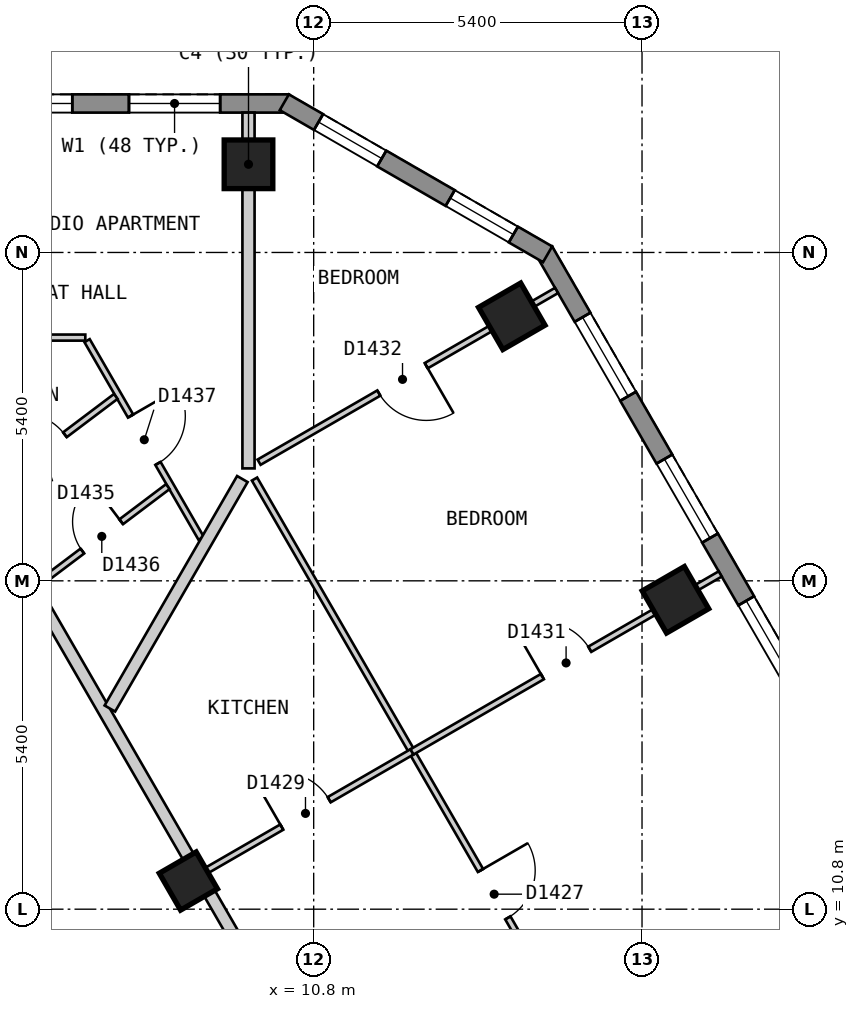
"""IFC4 building model, lengths in metres.
Left out: names, types, materials, properties, quantities, classifications, styles, units other than length and angle.
Written with IfcOpenShell. Run it as: python <this file> out.ifc"""

import sys

from ifc_helpers import new_model, si_unit, direction, frame, frame_2d, origin, origin_2d, place, context, subcontext, project, spatial, polyline, rectangle, outline, extrude, element, fill, save


model = new_model("IFC4")
c1 = context("Model", 3, precision=1e-05, world=origin(), true_north=direction((0.0, 1.0)))
c2 = subcontext(c1, "Body", "Model", "MODEL_VIEW")
j1 = project(units=[si_unit("LENGTHUNIT", "METRE"), si_unit("PLANEANGLEUNIT", "RADIAN")], contexts=[c1])
p1 = place(None, origin())
s1 = spatial("IfcSite", under=j1, at=p1, CompositionType="ELEMENT")
p2 = place(p1, origin())
s2 = spatial("IfcBuilding", under=s1, at=p2, CompositionType="ELEMENT")
p3 = place(p2, frame((0.0, 0.0, 166.2)))
s3 = spatial("IfcBuildingStorey", under=s2, at=p3, CompositionType="ELEMENT", Elevation=166.2)
for number, where, z_axis, x_axis in (
    (1, (9.728, 23.05, 0.0), (0.0, 0.0, 1.0), (-1.0, 0.0, 0.0)),
    (2, (16.75, 15.888, 0.0), (0.0, 0.0, 1.0), (-0.5, 0.866, 0.0)),
    (3, (14.058, 20.55, 0.0), (0.0, 0.0, 1.0), (-0.5, 0.866, 0.0)),
):
    element("IfcColumn", number, at=place(p3, frame(where, z_axis=z_axis, x_axis=x_axis)), inside=s3, PredefinedType="COLUMN", context=c2, shape_type="SweptSolid", body=[
        extrude(rectangle(XDim=0.8, YDim=0.8, at=origin_2d()), origin(), (0.0, 0.0, 1.0), 3.0),
    ])
p4 = place(p3, frame((8.739, 11.263, 0.0), z_axis=(0.0, 0.0, 1.0), x_axis=(-0.5, 0.866025403784, 0.0)))
e4 = element("IfcColumn", 4, at=p4, inside=s3, PredefinedType="COLUMN", context=c2, shape_type="SweptSolid", body=[
    extrude(rectangle(XDim=0.7, YDim=0.7, at=origin_2d()), origin(), (0.0, 0.0, 1.0), 3.0),
])
p5 = place(p3, frame((10.392, 24.05, 0.0), z_axis=(0.0, 0.0, 1.0), x_axis=(-1.0, 0.0, 0.0)))
e5 = element("IfcWall", 5, at=p5, inside=s3, PredefinedType="SOLIDWALL", context=c2, shape_type="SweptSolid", body=[
    extrude(outline(polyline([(0.0, -0.15), (20.784, -0.15), (20.704, 0.15), (0.08, 0.15), (0.0, -0.15)])), origin(), (0.0, 0.0, 1.0), 2.7),
])
p6 = place(p5, frame((1.13, 0.0, 0.15)))
e6 = element("IfcOpeningElement", 6, at=p6, cuts=e5, PredefinedType="OPENING", context=c2, shape_type="SweptSolid", body=[
    extrude(rectangle(XDim=1.5, YDim=2.1, at=frame_2d((0.75, 1.05))), frame((0.0, 0.16, 0.0), z_axis=(0.0, -1.0, 0.0), x_axis=(1.0, 0.0, 0.0)), (0.0, 0.0, 1.0), 0.32),
])
p7 = place(p5, frame((3.562, 0.0, 0.15)))
e7 = element("IfcOpeningElement", 7, at=p7, cuts=e5, PredefinedType="OPENING", context=c2, shape_type="SweptSolid", body=[
    extrude(rectangle(XDim=1.5, YDim=2.1, at=frame_2d((0.75, 1.05))), frame((0.0, 0.16, 0.0), z_axis=(0.0, -1.0, 0.0), x_axis=(1.0, 0.0, 0.0)), (0.0, 0.0, 1.0), 0.32),
])
p8 = place(p5, frame((5.994, 0.0, 0.15)))
e8 = element("IfcOpeningElement", 8, at=p8, cuts=e5, PredefinedType="OPENING", context=c2, shape_type="SweptSolid", body=[
    extrude(rectangle(XDim=1.5, YDim=2.1, at=frame_2d((0.75, 1.05))), frame((0.0, 0.16, 0.0), z_axis=(0.0, -1.0, 0.0), x_axis=(1.0, 0.0, 0.0)), (0.0, 0.0, 1.0), 0.32),
])
p9 = place(p5, frame((8.426, 0.0, 0.15)))
e9 = element("IfcOpeningElement", 9, at=p9, cuts=e5, PredefinedType="OPENING", context=c2, shape_type="SweptSolid", body=[
    extrude(rectangle(XDim=1.5, YDim=2.1, at=frame_2d((0.75, 1.05))), frame((0.0, 0.16, 0.0), z_axis=(0.0, -1.0, 0.0), x_axis=(1.0, 0.0, 0.0)), (0.0, 0.0, 1.0), 0.32),
])
p10 = place(p5, frame((10.858, 0.0, 0.15)))
e10 = element("IfcOpeningElement", 10, at=p10, cuts=e5, PredefinedType="OPENING", context=c2, shape_type="SweptSolid", body=[
    extrude(rectangle(XDim=1.5, YDim=2.1, at=frame_2d((0.75, 1.05))), frame((0.0, 0.16, 0.0), z_axis=(0.0, -1.0, 0.0), x_axis=(1.0, 0.0, 0.0)), (0.0, 0.0, 1.0), 0.32),
])
p11 = place(p5, frame((13.29, 0.0, 0.15)))
e11 = element("IfcOpeningElement", 11, at=p11, cuts=e5, PredefinedType="OPENING", context=c2, shape_type="SweptSolid", body=[
    extrude(rectangle(XDim=1.5, YDim=2.1, at=frame_2d((0.75, 1.05))), frame((0.0, 0.16, 0.0), z_axis=(0.0, -1.0, 0.0), x_axis=(1.0, 0.0, 0.0)), (0.0, 0.0, 1.0), 0.32),
])
p12 = place(p5, frame((15.722, 0.0, 0.15)))
e12 = element("IfcOpeningElement", 12, at=p12, cuts=e5, PredefinedType="OPENING", context=c2, shape_type="SweptSolid", body=[
    extrude(rectangle(XDim=1.5, YDim=2.1, at=frame_2d((0.75, 1.05))), frame((0.0, 0.16, 0.0), z_axis=(0.0, -1.0, 0.0), x_axis=(1.0, 0.0, 0.0)), (0.0, 0.0, 1.0), 0.32),
])
p13 = place(p5, frame((18.154, 0.0, 0.15)))
e13 = element("IfcOpeningElement", 13, at=p13, cuts=e5, PredefinedType="OPENING", context=c2, shape_type="SweptSolid", body=[
    extrude(rectangle(XDim=1.5, YDim=2.1, at=frame_2d((0.75, 1.05))), frame((0.0, 0.16, 0.0), z_axis=(0.0, -1.0, 0.0), x_axis=(1.0, 0.0, 0.0)), (0.0, 0.0, 1.0), 0.32),
])
p14 = place(p3, frame((26.024, 1.825, 0.0), z_axis=(0.0, 0.0, 1.0), x_axis=(-0.500010537973, 0.866019319597, 0.0)))
e14 = element("IfcWall", 14, at=p14, inside=s3, PredefinedType="SOLIDWALL", context=c2, shape_type="SweptSolid", body=[
    extrude(outline(polyline([(0.0, -0.15), (22.863, -0.15), (22.783, 0.15), (0.08, 0.15), (0.0, -0.15)])), origin(), (0.0, 0.0, 1.0), 2.7),
])
p15 = place(p14, frame((1.259, 0.0, 0.15)))
e15 = element("IfcOpeningElement", 15, at=p15, cuts=e14, PredefinedType="OPENING", context=c2, shape_type="SweptSolid", body=[
    extrude(rectangle(XDim=1.5, YDim=2.1, at=frame_2d((0.75, 1.05))), frame((0.0, 0.16, 0.0), z_axis=(0.0, -1.0, 0.0), x_axis=(1.0, 0.0, 0.0)), (0.0, 0.0, 1.0), 0.32),
])
p16 = place(p14, frame((3.952, 0.0, 0.15)))
e16 = element("IfcOpeningElement", 16, at=p16, cuts=e14, PredefinedType="OPENING", context=c2, shape_type="SweptSolid", body=[
    extrude(rectangle(XDim=1.5, YDim=2.1, at=frame_2d((0.75, 1.05))), frame((0.0, 0.16, 0.0), z_axis=(0.0, -1.0, 0.0), x_axis=(1.0, 0.0, 0.0)), (0.0, 0.0, 1.0), 0.32),
])
p17 = place(p14, frame((6.644, 0.0, 0.15)))
e17 = element("IfcOpeningElement", 17, at=p17, cuts=e14, PredefinedType="OPENING", context=c2, shape_type="SweptSolid", body=[
    extrude(rectangle(XDim=1.5, YDim=2.1, at=frame_2d((0.75, 1.05))), frame((0.0, 0.16, 0.0), z_axis=(0.0, -1.0, 0.0), x_axis=(1.0, 0.0, 0.0)), (0.0, 0.0, 1.0), 0.32),
])
p18 = place(p14, frame((9.335, 0.0, 0.15)))
e18 = element("IfcOpeningElement", 18, at=p18, cuts=e14, PredefinedType="OPENING", context=c2, shape_type="SweptSolid", body=[
    extrude(rectangle(XDim=1.5, YDim=2.1, at=frame_2d((0.75, 1.05))), frame((0.0, 0.16, 0.0), z_axis=(0.0, -1.0, 0.0), x_axis=(1.0, 0.0, 0.0)), (0.0, 0.0, 1.0), 0.32),
])
p19 = place(p14, frame((12.028, 0.0, 0.15)))
e19 = element("IfcOpeningElement", 19, at=p19, cuts=e14, PredefinedType="OPENING", context=c2, shape_type="SweptSolid", body=[
    extrude(rectangle(XDim=1.5, YDim=2.1, at=frame_2d((0.75, 1.05))), frame((0.0, 0.16, 0.0), z_axis=(0.0, -1.0, 0.0), x_axis=(1.0, 0.0, 0.0)), (0.0, 0.0, 1.0), 0.32),
])
p20 = place(p14, frame((14.72, 0.0, 0.15)))
e20 = element("IfcOpeningElement", 20, at=p20, cuts=e14, PredefinedType="OPENING", context=c2, shape_type="SweptSolid", body=[
    extrude(rectangle(XDim=1.5, YDim=2.1, at=frame_2d((0.75, 1.05))), frame((0.0, 0.16, 0.0), z_axis=(0.0, -1.0, 0.0), x_axis=(1.0, 0.0, 0.0)), (0.0, 0.0, 1.0), 0.32),
])
p21 = place(p14, frame((17.411, 0.0, 0.15)))
e21 = element("IfcOpeningElement", 21, at=p21, cuts=e14, PredefinedType="OPENING", context=c2, shape_type="SweptSolid", body=[
    extrude(rectangle(XDim=1.5, YDim=2.1, at=frame_2d((0.75, 1.05))), frame((0.0, 0.16, 0.0), z_axis=(0.0, -1.0, 0.0), x_axis=(1.0, 0.0, 0.0)), (0.0, 0.0, 1.0), 0.32),
])
p22 = place(p14, frame((20.104, 0.0, 0.15)))
e22 = element("IfcOpeningElement", 22, at=p22, cuts=e14, PredefinedType="OPENING", context=c2, shape_type="SweptSolid", body=[
    extrude(rectangle(XDim=1.5, YDim=2.1, at=frame_2d((0.75, 1.05))), frame((0.0, 0.16, 0.0), z_axis=(0.0, -1.0, 0.0), x_axis=(1.0, 0.0, 0.0)), (0.0, 0.0, 1.0), 0.32),
])
p23 = place(p3, frame((14.647, 21.57, 0.0), z_axis=(0.0, 0.0, 1.0), x_axis=(-0.866022959057, 0.500004234368, 0.0)))
e23 = element("IfcWall", 23, at=p23, inside=s3, PredefinedType="SOLIDWALL", context=c2, shape_type="SweptSolid", body=[
    extrude(outline(polyline([(0.0, -0.15), (5.0, -0.15), (4.92, 0.15), (0.08, 0.15), (0.0, -0.15)])), origin(), (0.0, 0.0, 1.0), 2.7),
])
p24 = place(p23, frame((0.65, 0.0, 0.15)))
e24 = element("IfcOpeningElement", 24, at=p24, cuts=e23, PredefinedType="OPENING", context=c2, shape_type="SweptSolid", body=[
    extrude(rectangle(XDim=1.2, YDim=2.1, at=frame_2d((0.6, 1.05))), frame((0.0, 0.16, 0.0), z_axis=(0.0, -1.0, 0.0), x_axis=(1.0, 0.0, 0.0)), (0.0, 0.0, 1.0), 0.32),
])
p25 = place(p23, frame((3.15, 0.0, 0.15)))
e25 = element("IfcOpeningElement", 25, at=p25, cuts=e23, PredefinedType="OPENING", context=c2, shape_type="SweptSolid", body=[
    extrude(rectangle(XDim=1.2, YDim=2.1, at=frame_2d((0.6, 1.05))), frame((0.0, 0.16, 0.0), z_axis=(0.0, -1.0, 0.0), x_axis=(1.0, 0.0, 0.0)), (0.0, 0.0, 1.0), 0.32),
])
p26 = place(p3, frame((5.485, 17.3, 0.0), z_axis=(0.0, 0.0, 1.0), x_axis=(0.499965832213, -0.866045129667, 0.0)))
e26 = element("IfcWall", 26, at=p26, inside=s3, PredefinedType="PARTITIONING", context=c2, shape_type="SweptSolid", body=[
    extrude(rectangle(XDim=10.739, YDim=0.2, at=frame_2d((5.369, 0.0))), origin(), (0.0, 0.0, 1.0), 2.7),
])
p27 = place(p26, frame((9.048, 0.0, 0.0)))
e27 = element("IfcOpeningElement", 27, at=p27, cuts=e26, PredefinedType="OPENING", context=c2, shape_type="SweptSolid", body=[
    extrude(rectangle(XDim=1.0, YDim=2.1, at=frame_2d((0.5, 1.05))), frame((0.0, 0.11, 0.0), z_axis=(0.0, -1.0, 0.0), x_axis=(1.0, 0.0, 0.0)), (0.0, 0.0, 1.0), 0.22),
])
p28 = place(p26, frame((0.161, 0.0, 0.0)))
e28 = element("IfcOpeningElement", 28, at=p28, cuts=e26, PredefinedType="OPENING", context=c2, shape_type="SweptSolid", body=[
    extrude(rectangle(XDim=0.9, YDim=2.1, at=frame_2d((0.45, 1.05))), frame((0.0, 0.11, 0.0), z_axis=(0.0, -1.0, 0.0), x_axis=(1.0, 0.0, 0.0)), (0.0, 0.0, 1.0), 0.22),
])
p29 = place(p3, frame((7.073, 20.15, 0.0), z_axis=(0.0, 0.0, 1.0), x_axis=(0.499917691695, -0.866072919292, 0.0)))
e29 = element("IfcWall", 29, at=p29, inside=s3, PredefinedType="PARTITIONING", context=c2, shape_type="SweptSolid", body=[
    extrude(rectangle(XDim=3.753, YDim=0.1, at=frame_2d((1.876, 0.0))), origin(), (0.0, 0.0, 1.0), 2.7),
])
p30 = place(p29, frame((1.432, 0.0, 0.0)))
e30 = element("IfcOpeningElement", 30, at=p30, cuts=e29, PredefinedType="OPENING", context=c2, shape_type="SweptSolid", body=[
    extrude(rectangle(XDim=0.9, YDim=2.1, at=frame_2d((0.45, 1.05))), frame((0.0, 0.06, 0.0), z_axis=(0.0, -1.0, 0.0), x_axis=(1.0, 0.0, 0.0)), (0.0, 0.0, 1.0), 0.12),
])
p31 = place(p3, frame((9.827, 17.874, 0.0), z_axis=(0.0, 0.0, 1.0), x_axis=(0.499962189394, -0.866047232647, 0.0)))
e31 = element("IfcWall", 31, at=p31, inside=s3, PredefinedType="PARTITIONING", context=c2, shape_type="SweptSolid", body=[
    extrude(rectangle(XDim=11.401, YDim=0.1, at=frame_2d((5.701, 0.0))), origin(), (0.0, 0.0, 1.0), 2.7),
])
p32 = place(p31, frame((7.433, 0.0, 0.0)))
e32 = element("IfcOpeningElement", 32, at=p32, cuts=e31, PredefinedType="OPENING", context=c2, shape_type="SweptSolid", body=[
    extrude(rectangle(XDim=0.9, YDim=2.1, at=frame_2d((0.45, 1.05))), frame((0.0, 0.06, 0.0), z_axis=(0.0, -1.0, 0.0), x_axis=(1.0, 0.0, 0.0)), (0.0, 0.0, 1.0), 0.12),
])
p33 = place(p3, frame((4.964, 20.2, 0.0), z_axis=(0.0, 0.0, 1.0), x_axis=(1.0, 0.0, 0.0)))
e33 = element("IfcWall", 33, at=p33, inside=s3, PredefinedType="PARTITIONING", context=c2, shape_type="SweptSolid", body=[
    extrude(rectangle(XDim=2.08, YDim=0.1, at=frame_2d((1.04, 0.0))), origin(), (0.0, 0.0, 1.0), 2.7),
])
p34 = place(p3, frame((8.999, 11.413, 0.0), z_axis=(0.0, 0.0, 1.0), x_axis=(0.865969252911, 0.500097243556, 0.0)))
e34 = element("IfcWall", 34, at=p34, inside=s3, PredefinedType="PARTITIONING", context=c2, shape_type="SweptSolid", body=[
    extrude(rectangle(XDim=3.947, YDim=0.1, at=frame_2d((1.974, 0.0))), origin(), (0.0, 0.0, 1.0), 2.7),
])
p35 = place(p34, frame((1.474, 0.0, 0.0)))
e35 = element("IfcOpeningElement", 35, at=p35, cuts=e34, PredefinedType="OPENING", context=c2, shape_type="SweptSolid", body=[
    extrude(rectangle(XDim=0.9, YDim=2.1, at=frame_2d((0.45, 1.05))), frame((0.0, 0.06, 0.0), z_axis=(0.0, -1.0, 0.0), x_axis=(1.0, 0.0, 0.0)), (0.0, 0.0, 1.0), 0.12),
])
p36 = place(p3, frame((9.902, 18.151, 0.0), z_axis=(0.0, 0.0, 1.0), x_axis=(0.866032278734, 0.499988092049, 0.0)))
e36 = element("IfcWall", 36, at=p36, inside=s3, PredefinedType="PARTITIONING", context=c2, shape_type="SweptSolid", body=[
    extrude(rectangle(XDim=5.649, YDim=0.1, at=frame_2d((2.824, 0.0))), origin(), (0.0, 0.0, 1.0), 2.7),
])
p37 = place(p36, frame((2.274, 0.0, 0.0)))
e37 = element("IfcOpeningElement", 37, at=p37, cuts=e36, PredefinedType="OPENING", context=c2, shape_type="SweptSolid", body=[
    extrude(rectangle(XDim=0.9, YDim=2.1, at=frame_2d((0.45, 1.05))), frame((0.0, 0.06, 0.0), z_axis=(0.0, -1.0, 0.0), x_axis=(1.0, 0.0, 0.0)), (0.0, 0.0, 1.0), 0.12),
])
p38 = place(p3, frame((6.269, 16.142, 0.0), z_axis=(0.0, 0.0, 1.0), x_axis=(0.798549086509, 0.601929693931, 0.0)))
e38 = element("IfcWall", 38, at=p38, inside=s3, PredefinedType="PARTITIONING", context=c2, shape_type="SweptSolid", body=[
    extrude(rectangle(XDim=2.67, YDim=0.1, at=frame_2d((1.335, 0.0))), origin(), (0.0, 0.0, 1.0), 2.7),
])
p39 = place(p38, frame((0.91, 0.0, 0.0)))
e39 = element("IfcOpeningElement", 39, at=p39, cuts=e38, PredefinedType="OPENING", context=c2, shape_type="SweptSolid", body=[
    extrude(rectangle(XDim=0.8, YDim=2.1, at=frame_2d((0.4, 1.05))), frame((0.0, 0.06, 0.0), z_axis=(0.0, -1.0, 0.0), x_axis=(1.0, 0.0, 0.0)), (0.0, 0.0, 1.0), 0.12),
])
p40 = place(p3, frame((5.113, 17.4, 0.0), z_axis=(0.0, 0.0, 1.0), x_axis=(0.798718434647, 0.601704962714, 0.0)))
e40 = element("IfcWall", 40, at=p40, inside=s3, PredefinedType="PARTITIONING", context=c2, shape_type="SweptSolid", body=[
    extrude(rectangle(XDim=3.045, YDim=0.1, at=frame_2d((1.522, 0.0))), origin(), (0.0, 0.0, 1.0), 2.7),
])
p41 = place(p40, frame((1.098, 0.0, 0.0)))
e41 = element("IfcOpeningElement", 41, at=p41, cuts=e40, PredefinedType="OPENING", context=c2, shape_type="SweptSolid", body=[
    extrude(rectangle(XDim=0.9, YDim=2.1, at=frame_2d((0.45, 1.05))), frame((0.0, 0.06, 0.0), z_axis=(0.0, -1.0, 0.0), x_axis=(1.0, 0.0, 0.0)), (0.0, 0.0, 1.0), 0.12),
])
p42 = place(p3, frame((7.448, 14.1, 0.0), z_axis=(0.0, 0.0, 1.0), x_axis=(0.500013426303, 0.866017651966, 0.0)))
e42 = element("IfcWall", 42, at=p42, inside=s3, PredefinedType="PARTITIONING", context=c2, shape_type="SweptSolid", body=[
    extrude(rectangle(XDim=4.358, YDim=0.2, at=frame_2d((2.179, 0.0))), origin(), (0.0, 0.0, 1.0), 2.7),
])
p43 = place(p3, frame((9.728, 18.049, 0.0), z_axis=(0.0, 0.0, 1.0), x_axis=(0.0, 1.0, 0.0)))
e43 = element("IfcWall", 43, at=p43, inside=s3, PredefinedType="PARTITIONING", context=c2, shape_type="SweptSolid", body=[
    extrude(rectangle(XDim=5.851, YDim=0.2, at=frame_2d((2.925, 0.0))), origin(), (0.0, 0.0, 1.0), 2.7),
])
p44 = place(p3, frame((12.417, 13.387, 0.0), z_axis=(0.0, 0.0, 1.0), x_axis=(0.866070981966, 0.499921047963, 0.0)))
e44 = element("IfcWall", 44, at=p44, inside=s3, PredefinedType="PARTITIONING", context=c2, shape_type="SweptSolid", body=[
    extrude(rectangle(XDim=5.853, YDim=0.1, at=frame_2d((2.927, 0.0))), origin(), (0.0, 0.0, 1.0), 2.7),
])
p45 = place(p44, frame((2.476, 0.0, 0.0)))
e45 = element("IfcOpeningElement", 45, at=p45, cuts=e44, PredefinedType="OPENING", context=c2, shape_type="SweptSolid", body=[
    extrude(rectangle(XDim=0.9, YDim=2.1, at=frame_2d((0.45, 1.05))), frame((0.0, 0.06, 0.0), z_axis=(0.0, -1.0, 0.0), x_axis=(1.0, 0.0, 0.0)), (0.0, 0.0, 1.0), 0.12),
])
p46 = place(p6, origin())
e46 = element("IfcWindow", 46, at=p46, inside=s3, PartitioningType="SINGLE_PANEL", PredefinedType="WINDOW", context=c2, shape_type="SweptSolid", body=[
    extrude(rectangle(XDim=1.5, YDim=2.1, at=frame_2d((0.75, 1.05))), frame((0.0, 0.03, 0.0), z_axis=(0.0, -1.0, 0.0), x_axis=(1.0, 0.0, 0.0)), (0.0, 0.0, 1.0), 0.06),
])
fill(e6, e46)
p47 = place(p7, origin())
e47 = element("IfcWindow", 47, at=p47, inside=s3, PartitioningType="SINGLE_PANEL", PredefinedType="WINDOW", context=c2, shape_type="SweptSolid", body=[
    extrude(rectangle(XDim=1.5, YDim=2.1, at=frame_2d((0.75, 1.05))), frame((0.0, 0.03, 0.0), z_axis=(0.0, -1.0, 0.0), x_axis=(1.0, 0.0, 0.0)), (0.0, 0.0, 1.0), 0.06),
])
fill(e7, e47)
p48 = place(p20, origin())
e48 = element("IfcWindow", 48, at=p48, inside=s3, PartitioningType="SINGLE_PANEL", PredefinedType="WINDOW", context=c2, shape_type="SweptSolid", body=[
    extrude(rectangle(XDim=1.5, YDim=2.1, at=frame_2d((0.75, 1.05))), frame((0.0, 0.03, 0.0), z_axis=(0.0, -1.0, 0.0), x_axis=(1.0, 0.0, 0.0)), (0.0, 0.0, 1.0), 0.06),
])
fill(e20, e48)
p49 = place(p21, origin())
e49 = element("IfcWindow", 49, at=p49, inside=s3, PartitioningType="SINGLE_PANEL", PredefinedType="WINDOW", context=c2, shape_type="SweptSolid", body=[
    extrude(rectangle(XDim=1.5, YDim=2.1, at=frame_2d((0.75, 1.05))), frame((0.0, 0.03, 0.0), z_axis=(0.0, -1.0, 0.0), x_axis=(1.0, 0.0, 0.0)), (0.0, 0.0, 1.0), 0.06),
])
fill(e21, e49)
p50 = place(p22, origin())
e50 = element("IfcWindow", 50, at=p50, inside=s3, PartitioningType="SINGLE_PANEL", PredefinedType="WINDOW", context=c2, shape_type="SweptSolid", body=[
    extrude(rectangle(XDim=1.5, YDim=2.1, at=frame_2d((0.75, 1.05))), frame((0.0, 0.03, 0.0), z_axis=(0.0, -1.0, 0.0), x_axis=(1.0, 0.0, 0.0)), (0.0, 0.0, 1.0), 0.06),
])
fill(e22, e50)
p51 = place(p24, origin())
e51 = element("IfcWindow", 51, at=p51, inside=s3, PartitioningType="SINGLE_PANEL", PredefinedType="WINDOW", context=c2, shape_type="SweptSolid", body=[
    extrude(rectangle(XDim=1.2, YDim=2.1, at=frame_2d((0.6, 1.05))), frame((0.0, 0.03, 0.0), z_axis=(0.0, -1.0, 0.0), x_axis=(1.0, 0.0, 0.0)), (0.0, 0.0, 1.0), 0.06),
])
fill(e24, e51)
p52 = place(p25, origin())
e52 = element("IfcWindow", 52, at=p52, inside=s3, PartitioningType="SINGLE_PANEL", PredefinedType="WINDOW", context=c2, shape_type="SweptSolid", body=[
    extrude(rectangle(XDim=1.2, YDim=2.1, at=frame_2d((0.6, 1.05))), frame((0.0, 0.03, 0.0), z_axis=(0.0, -1.0, 0.0), x_axis=(1.0, 0.0, 0.0)), (0.0, 0.0, 1.0), 0.06),
])
fill(e25, e52)
p53 = place(p32, origin())
e53 = element("IfcDoor", 53, at=p53, inside=s3, OperationType="SINGLE_SWING_LEFT", PredefinedType="DOOR", context=c2, shape_type="SweptSolid", body=[
    extrude(rectangle(XDim=0.9, YDim=2.1, at=frame_2d((0.45, 1.05))), frame((0.0, 0.025, 0.0), z_axis=(0.0, -1.0, 0.0), x_axis=(1.0, 0.0, 0.0)), (0.0, 0.0, 1.0), 0.05),
])
fill(e32, e53)
p54 = place(p35, origin())
e54 = element("IfcDoor", 54, at=p54, inside=s3, OperationType="SINGLE_SWING_LEFT", PredefinedType="DOOR", context=c2, shape_type="SweptSolid", body=[
    extrude(rectangle(XDim=0.9, YDim=2.1, at=frame_2d((0.45, 1.05))), frame((0.0, 0.025, 0.0), z_axis=(0.0, -1.0, 0.0), x_axis=(1.0, 0.0, 0.0)), (0.0, 0.0, 1.0), 0.05),
])
fill(e35, e54)
p55 = place(p45, origin())
e55 = element("IfcDoor", 55, at=p55, inside=s3, OperationType="SINGLE_SWING_LEFT", PredefinedType="DOOR", context=c2, shape_type="SweptSolid", body=[
    extrude(rectangle(XDim=0.9, YDim=2.1, at=frame_2d((0.45, 1.05))), frame((0.0, 0.025, 0.0), z_axis=(0.0, -1.0, 0.0), x_axis=(1.0, 0.0, 0.0)), (0.0, 0.0, 1.0), 0.05),
])
fill(e45, e55)
p56 = place(p37, origin())
e56 = element("IfcDoor", 56, at=p56, inside=s3, OperationType="SINGLE_SWING_RIGHT", PredefinedType="DOOR", context=c2, shape_type="SweptSolid", body=[
    extrude(rectangle(XDim=0.9, YDim=2.1, at=frame_2d((0.45, 1.05))), frame((0.0, 0.025, 0.0), z_axis=(0.0, -1.0, 0.0), x_axis=(1.0, 0.0, 0.0)), (0.0, 0.0, 1.0), 0.05),
])
fill(e37, e56)
p57 = place(p41, origin())
e57 = element("IfcDoor", 57, at=p57, inside=s3, OperationType="SINGLE_SWING_LEFT", PredefinedType="DOOR", context=c2, shape_type="SweptSolid", body=[
    extrude(rectangle(XDim=0.9, YDim=2.1, at=frame_2d((0.45, 1.05))), frame((0.0, 0.025, 0.0), z_axis=(0.0, -1.0, 0.0), x_axis=(1.0, 0.0, 0.0)), (0.0, 0.0, 1.0), 0.05),
])
fill(e41, e57)
p58 = place(p39, origin())
e58 = element("IfcDoor", 58, at=p58, inside=s3, OperationType="SINGLE_SWING_RIGHT", PredefinedType="DOOR", context=c2, shape_type="SweptSolid", body=[
    extrude(rectangle(XDim=0.8, YDim=2.1, at=frame_2d((0.4, 1.05))), frame((0.0, 0.025, 0.0), z_axis=(0.0, -1.0, 0.0), x_axis=(1.0, 0.0, 0.0)), (0.0, 0.0, 1.0), 0.05),
])
fill(e39, e58)
p59 = place(p30, origin())
e59 = element("IfcDoor", 59, at=p59, inside=s3, OperationType="SINGLE_SWING_LEFT", PredefinedType="DOOR", context=c2, shape_type="SweptSolid", body=[
    extrude(rectangle(XDim=0.9, YDim=2.1, at=frame_2d((0.45, 1.05))), frame((0.0, 0.025, 0.0), z_axis=(0.0, -1.0, 0.0), x_axis=(1.0, 0.0, 0.0)), (0.0, 0.0, 1.0), 0.05),
])
fill(e30, e59)
save(model, sys.argv[1])
